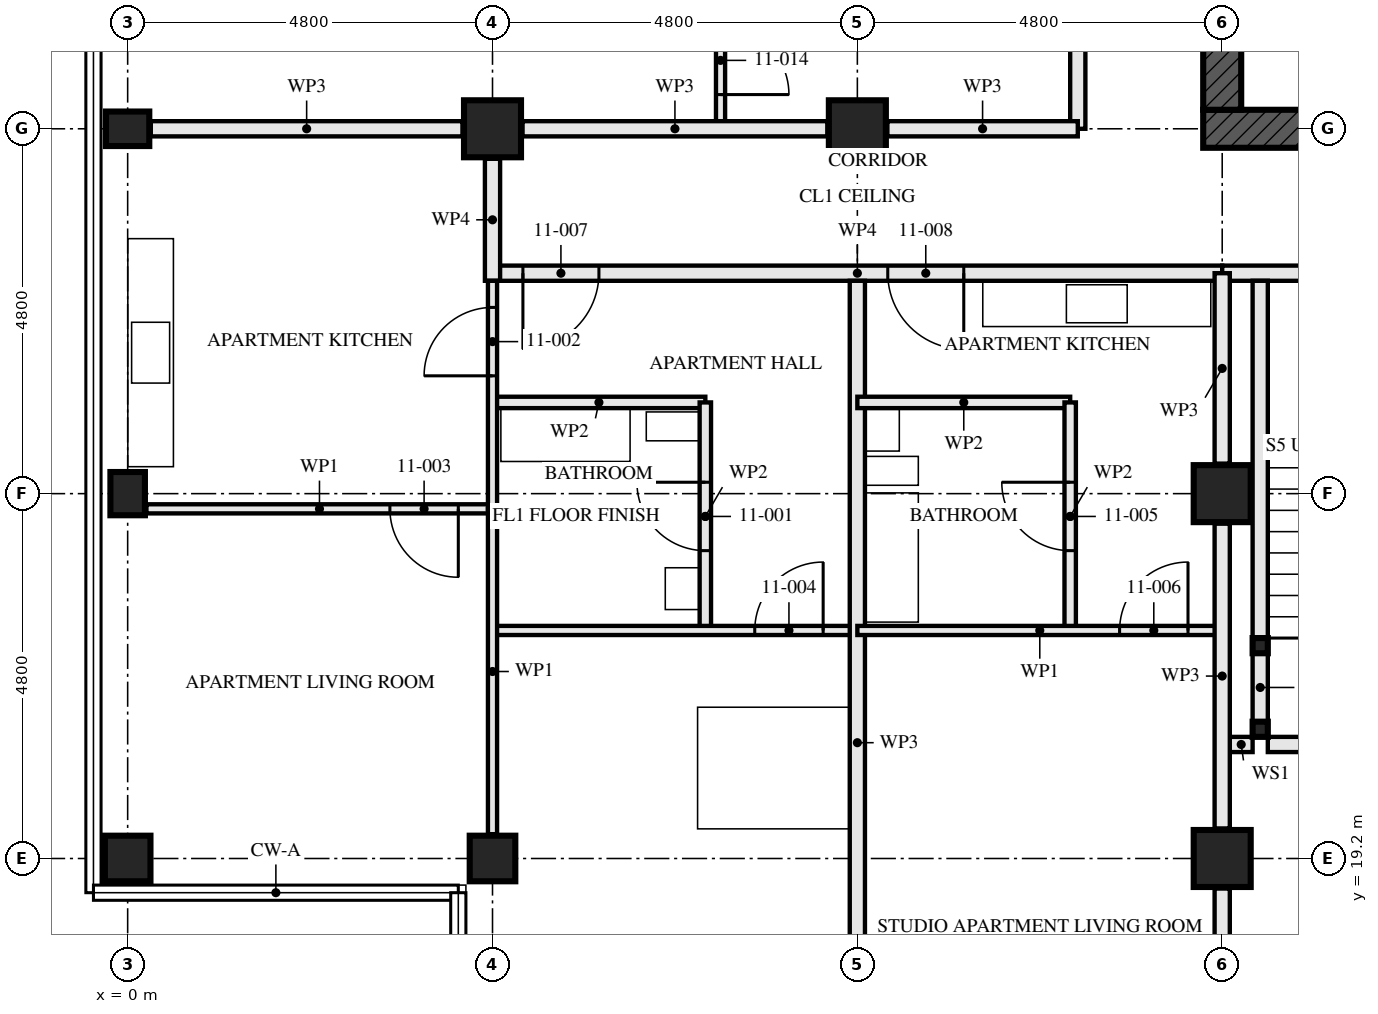
"""IFC4 building model, lengths in metres.
Left out: names, types, materials, properties, quantities, classifications, styles, units other than length and angle.
Written with IfcOpenShell. Run it as: python <this file> out.ifc"""

import sys

from ifc_helpers import new_model, si_unit, direction, frame, frame_2d, origin, origin_2d, place, context, subcontext, project, spatial, rectangle, hollow_rectangle, i_section, extrude, element, fill, save


model = new_model("IFC4")
c1 = context("Model", 3, precision=1e-05, world=origin(), true_north=direction((0.0, 1.0)))
c2 = subcontext(c1, "Body", "Model", "MODEL_VIEW")
j1 = project(units=[si_unit("LENGTHUNIT", "METRE"), si_unit("PLANEANGLEUNIT", "RADIAN")], contexts=[c1])
p1 = place(None, origin())
s1 = spatial("IfcSite", under=j1, at=p1, CompositionType="ELEMENT")
p2 = place(p1, origin())
s2 = spatial("IfcBuilding", under=s1, at=p2, CompositionType="ELEMENT")
p3 = place(p2, frame((0.0, 0.0, 44.5)))
s3 = spatial("IfcBuildingStorey", under=s2, at=p3, CompositionType="ELEMENT", Elevation=44.5)
p4 = place(p3, frame((0.0, 19.2, 0.0), z_axis=(0.0, 0.0, 1.0), x_axis=(0.0, 1.0, 0.0)))
e1 = element("IfcColumn", 1, at=p4, inside=s3, PredefinedType="COLUMN", context=c2, shape_type="SweptSolid", body=[
    extrude(hollow_rectangle(XDim=0.6, YDim=0.6, WallThickness=0.05, at=origin_2d()), origin(), (0.0, 0.0, 1.0), 3.5),
])
for number, where, z_axis, x_axis in (
    (2, (0.0, 24.0, 0.0), (0.0, 0.0, 1.0), (1.0, 0.0, 0.0)),
    (3, (0.0, 28.8, 0.0), (0.0, 0.0, 1.0), (0.0, 1.0, 0.0)),
):
    element("IfcColumn", number, at=place(p3, frame(where, z_axis=z_axis, x_axis=x_axis)), inside=s3, PredefinedType="COLUMN", context=c2, shape_type="SweptSolid", body=[
        extrude(i_section(OverallWidth=0.454, OverallDepth=0.569, WebThickness=0.078, FlangeThickness=0.125, FilletRadius=0.015, at=origin_2d()), origin(), (0.0, 0.0, 1.0), 3.5),
    ])
p5 = place(p3, frame((4.8, 19.2, 0.0), z_axis=(0.0, 0.0, 1.0), x_axis=(0.0, 1.0, 0.0)))
e4 = element("IfcColumn", 4, at=p5, inside=s3, PredefinedType="COLUMN", context=c2, shape_type="SweptSolid", body=[
    extrude(hollow_rectangle(XDim=0.6, YDim=0.6, WallThickness=0.05, at=origin_2d()), origin(), (0.0, 0.0, 1.0), 3.5),
])
for number, where, z_axis, x_axis in (
    (5, (4.8, 28.8, 0.0), (0.0, 0.0, 1.0), (0.0, 1.0, 0.0)),
    (6, (9.6, 28.8, 0.0), (0.0, 0.0, 1.0), (0.0, 1.0, 0.0)),
    (7, (14.4, 19.2, 0.0), (0.0, 0.0, 1.0), (1.0, 0.0, 0.0)),
    (8, (14.4, 24.0, 0.0), (0.0, 0.0, 1.0), (1.0, 0.0, 0.0)),
):
    element("IfcColumn", number, at=place(p3, frame(where, z_axis=z_axis, x_axis=x_axis)), inside=s3, PredefinedType="COLUMN", context=c2, shape_type="SweptSolid", body=[
        extrude(hollow_rectangle(XDim=0.75, YDim=0.75, WallThickness=0.08, at=origin_2d()), origin(), (0.0, 0.0, 1.0), 3.5),
    ])
p6 = place(p3, frame((14.15, 28.8, -0.17), z_axis=(0.0, 0.0, 1.0), x_axis=(1.0, 0.0, 0.0)))
e9 = element("IfcWall", 9, at=p6, inside=s3, PredefinedType="SHEAR", context=c2, shape_type="SweptSolid", body=[
    extrude(rectangle(XDim=14.9, YDim=0.5, at=frame_2d((7.45, 0.0))), origin(), (0.0, 0.0, 1.0), 3.5),
])
p7 = place(p6, frame((6.85, 0.0, 0.17)))
e10 = element("IfcOpeningElement", 10, at=p7, cuts=e9, PredefinedType="OPENING", context=c2, shape_type="SweptSolid", body=[
    extrude(rectangle(XDim=1.2, YDim=2.1, at=frame_2d((0.6, 1.05))), frame((0.0, 0.26, 0.0), z_axis=(0.0, -1.0, 0.0), x_axis=(1.0, 0.0, 0.0)), (0.0, 0.0, 1.0), 0.521),
])
p8 = place(p3, frame((14.4, 42.95, -0.17), z_axis=(0.0, 0.0, 1.0), x_axis=(0.0, -1.0, 0.0)))
e11 = element("IfcWall", 11, at=p8, inside=s3, PredefinedType="SHEAR", context=c2, shape_type="SweptSolid", body=[
    extrude(rectangle(XDim=13.9, YDim=0.5, at=frame_2d((6.95, 0.0))), origin(), (0.0, 0.0, 1.0), 3.5),
])
p9 = place(p8, frame((6.35, 0.0, 0.17)))
e12 = element("IfcOpeningElement", 12, at=p9, cuts=e11, PredefinedType="OPENING", context=c2, shape_type="SweptSolid", body=[
    extrude(rectangle(XDim=1.2, YDim=2.1, at=frame_2d((0.6, 1.05))), frame((0.0, 0.26, 0.0), z_axis=(0.0, -1.0, 0.0), x_axis=(1.0, 0.0, 0.0)), (0.0, 0.0, 1.0), 0.521),
])
for number, where, z_axis, x_axis in (
    (13, (14.9, 20.9, 0.0), (0.0, 0.0, 1.0), (1.0, 0.0, 0.0)),
    (14, (14.9, 22.0, 0.0), (0.0, 0.0, 1.0), (1.0, 0.0, 0.0)),
):
    element("IfcColumn", number, at=place(p3, frame(where, z_axis=z_axis, x_axis=x_axis)), inside=s3, PredefinedType="COLUMN", context=c2, shape_type="SweptSolid", body=[
        extrude(hollow_rectangle(XDim=0.2, YDim=0.2, WallThickness=0.008, at=origin_2d()), origin(), (0.0, 0.0, 1.0), 3.33),
    ])
p10 = place(p3, frame((7.6, 22.2, 0.0), z_axis=(0.0, 0.0, 1.0), x_axis=(0.0, 1.0, 0.0)))
e15 = element("IfcWall", 15, at=p10, inside=s3, PredefinedType="PARTITIONING", context=c2, shape_type="SweptSolid", body=[
    extrude(rectangle(XDim=3.0, YDim=0.15, at=frame_2d((1.5, 0.0))), origin(), (0.0, 0.0, 1.0), 2.55),
])
p11 = place(p10, frame((1.05, 0.0, 0.0)))
e16 = element("IfcOpeningElement", 16, at=p11, cuts=e15, PredefinedType="OPENING", context=c2, shape_type="SweptSolid", body=[
    extrude(rectangle(XDim=0.9, YDim=2.1, at=frame_2d((0.45, 1.05))), frame((0.0, 0.085, 0.0), z_axis=(0.0, -1.0, 0.0), x_axis=(1.0, 0.0, 0.0)), (0.0, 0.0, 1.0), 0.171),
])
p12 = place(p3, frame((4.8, 25.2, 0.0), z_axis=(0.0, 0.0, 1.0), x_axis=(1.0, 0.0, 0.0)))
e17 = element("IfcWall", 17, at=p12, inside=s3, PredefinedType="PARTITIONING", context=c2, shape_type="SweptSolid", body=[
    extrude(rectangle(XDim=2.8, YDim=0.15, at=frame_2d((1.4, 0.0))), origin(), (0.0, 0.0, 1.0), 3.33),
])
p13 = place(p3, frame((4.8, 23.8, 0.0), z_axis=(0.0, 0.0, 1.0), x_axis=(0.0, 1.0, 0.0)))
e18 = element("IfcWall", 18, at=p13, inside=s3, PredefinedType="PARTITIONING", context=c2, shape_type="SweptSolid", body=[
    extrude(rectangle(XDim=3.0, YDim=0.12, at=frame_2d((1.5, 0.0))), origin(), (0.0, 0.0, 1.0), 2.55),
])
p14 = place(p13, frame((1.75, 0.0, 0.0)))
e19 = element("IfcOpeningElement", 19, at=p14, cuts=e18, PredefinedType="OPENING", context=c2, shape_type="SweptSolid", body=[
    extrude(rectangle(XDim=0.9, YDim=2.1, at=frame_2d((0.45, 1.05))), frame((0.0, 0.071, 0.0), z_axis=(0.0, -1.0, 0.0), x_axis=(1.0, 0.0, 0.0)), (0.0, 0.0, 1.0), 0.141),
])
p15 = place(p3, frame((0.247, 23.8, 0.0), z_axis=(0.0, 0.0, 1.0), x_axis=(1.0, 0.0, 0.0)))
e20 = element("IfcWall", 20, at=p15, inside=s3, PredefinedType="PARTITIONING", context=c2, shape_type="SweptSolid", body=[
    extrude(rectangle(XDim=4.553, YDim=0.12, at=frame_2d((2.276, 0.0))), origin(), (0.0, 0.0, 1.0), 3.33),
])
p16 = place(p15, frame((3.203, 0.0, 0.0)))
e21 = element("IfcOpeningElement", 21, at=p16, cuts=e20, PredefinedType="OPENING", context=c2, shape_type="SweptSolid", body=[
    extrude(rectangle(XDim=0.9, YDim=2.1, at=frame_2d((0.45, 1.05))), frame((0.0, 0.071, 0.0), z_axis=(0.0, -1.0, 0.0), x_axis=(1.0, 0.0, 0.0)), (0.0, 0.0, 1.0), 0.141),
])
p17 = place(p3, frame((4.8, 22.2, 0.0), z_axis=(0.0, 0.0, 1.0), x_axis=(1.0, 0.0, 0.0)))
e22 = element("IfcWall", 22, at=p17, inside=s3, PredefinedType="PARTITIONING", context=c2, shape_type="SweptSolid", body=[
    extrude(rectangle(XDim=4.8, YDim=0.12, at=frame_2d((2.4, 0.0))), origin(), (0.0, 0.0, 1.0), 3.33),
])
p18 = place(p17, frame((3.45, 0.0, 0.0)))
e23 = element("IfcOpeningElement", 23, at=p18, cuts=e22, PredefinedType="OPENING", context=c2, shape_type="SweptSolid", body=[
    extrude(rectangle(XDim=0.9, YDim=2.1, at=frame_2d((0.45, 1.05))), frame((0.0, 0.071, 0.0), z_axis=(0.0, -1.0, 0.0), x_axis=(1.0, 0.0, 0.0)), (0.0, 0.0, 1.0), 0.141),
])
p19 = place(p3, frame((4.8, 19.52, 0.0), z_axis=(0.0, 0.0, 1.0), x_axis=(0.0, 1.0, 0.0)))
e24 = element("IfcWall", 24, at=p19, inside=s3, PredefinedType="PARTITIONING", context=c2, shape_type="SweptSolid", body=[
    extrude(rectangle(XDim=4.28, YDim=0.12, at=frame_2d((2.14, 0.0))), origin(), (0.0, 0.0, 1.0), 3.33),
])
p20 = place(p3, frame((9.6, 14.647, 0.0), z_axis=(0.0, 0.0, 1.0), x_axis=(0.0, 1.0, 0.0)))
e25 = element("IfcWall", 25, at=p20, inside=s3, PredefinedType="PARTITIONING", context=c2, shape_type="SweptSolid", body=[
    extrude(rectangle(XDim=12.153, YDim=0.2, at=frame_2d((6.077, 0.0))), origin(), (0.0, 0.0, 1.0), 2.55),
])
p21 = place(p3, frame((12.4, 22.2, 0.0), z_axis=(0.0, 0.0, 1.0), x_axis=(0.0, 1.0, 0.0)))
e26 = element("IfcWall", 26, at=p21, inside=s3, PredefinedType="PARTITIONING", context=c2, shape_type="SweptSolid", body=[
    extrude(rectangle(XDim=3.0, YDim=0.15, at=frame_2d((1.5, 0.0))), origin(), (0.0, 0.0, 1.0), 2.55),
])
p22 = place(p21, frame((1.05, 0.0, 0.0)))
e27 = element("IfcOpeningElement", 27, at=p22, cuts=e26, PredefinedType="OPENING", context=c2, shape_type="SweptSolid", body=[
    extrude(rectangle(XDim=0.9, YDim=2.1, at=frame_2d((0.45, 1.05))), frame((0.0, 0.085, 0.0), z_axis=(0.0, -1.0, 0.0), x_axis=(1.0, 0.0, 0.0)), (0.0, 0.0, 1.0), 0.171),
])
p23 = place(p3, frame((9.6, 25.2, 0.0), z_axis=(0.0, 0.0, 1.0), x_axis=(1.0, 0.0, 0.0)))
e28 = element("IfcWall", 28, at=p23, inside=s3, PredefinedType="PARTITIONING", context=c2, shape_type="SweptSolid", body=[
    extrude(rectangle(XDim=2.8, YDim=0.15, at=frame_2d((1.4, 0.0))), origin(), (0.0, 0.0, 1.0), 3.33),
])
p24 = place(p3, frame((9.6, 22.2, 0.0), z_axis=(0.0, 0.0, 1.0), x_axis=(1.0, 0.0, 0.0)))
e29 = element("IfcWall", 29, at=p24, inside=s3, PredefinedType="PARTITIONING", context=c2, shape_type="SweptSolid", body=[
    extrude(rectangle(XDim=4.8, YDim=0.12, at=frame_2d((2.4, 0.0))), origin(), (0.0, 0.0, 1.0), 3.33),
])
p25 = place(p24, frame((3.45, 0.0, 0.0)))
e30 = element("IfcOpeningElement", 30, at=p25, cuts=e29, PredefinedType="OPENING", context=c2, shape_type="SweptSolid", body=[
    extrude(rectangle(XDim=0.9, YDim=2.1, at=frame_2d((0.45, 1.05))), frame((0.0, 0.071, 0.0), z_axis=(0.0, -1.0, 0.0), x_axis=(1.0, 0.0, 0.0)), (0.0, 0.0, 1.0), 0.141),
])
p26 = place(p3, frame((4.8, 26.9, 0.0), z_axis=(0.0, 0.0, 1.0), x_axis=(1.0, 0.0, 0.0)))
e31 = element("IfcWall", 31, at=p26, inside=s3, PredefinedType="PARTITIONING", context=c2, shape_type="SweptSolid", body=[
    extrude(rectangle(XDim=9.6, YDim=0.2, at=frame_2d((4.8, 0.0))), origin(), (0.0, 0.0, 1.0), 3.33),
])
p27 = place(p26, frame((0.4, 0.0, 0.0)))
e32 = element("IfcOpeningElement", 32, at=p27, cuts=e31, PredefinedType="OPENING", context=c2, shape_type="SweptSolid", body=[
    extrude(rectangle(XDim=1.0, YDim=2.1, at=frame_2d((0.5, 1.05))), frame((0.0, 0.111, 0.0), z_axis=(0.0, -1.0, 0.0), x_axis=(1.0, 0.0, 0.0)), (0.0, 0.0, 1.0), 0.221),
])
p28 = place(p26, frame((5.2, 0.0, 0.0)))
e33 = element("IfcOpeningElement", 33, at=p28, cuts=e31, PredefinedType="OPENING", context=c2, shape_type="SweptSolid", body=[
    extrude(rectangle(XDim=1.0, YDim=2.1, at=frame_2d((0.5, 1.05))), frame((0.0, 0.111, 0.0), z_axis=(0.0, -1.0, 0.0), x_axis=(1.0, 0.0, 0.0)), (0.0, 0.0, 1.0), 0.221),
])
p29 = place(p3, frame((4.8, 26.8, 0.0), z_axis=(0.0, 0.0, 1.0), x_axis=(0.0, 1.0, 0.0)))
e34 = element("IfcWall", 34, at=p29, inside=s3, PredefinedType="PARTITIONING", context=c2, shape_type="SweptSolid", body=[
    extrude(rectangle(XDim=1.605, YDim=0.2, at=frame_2d((0.802, 0.0))), origin(), (0.0, 0.0, 1.0), 3.33),
])
p30 = place(p3, frame((7.8, 33.6, 0.0), z_axis=(0.0, 0.0, 1.0), x_axis=(0.0, -1.0, 0.0)))
e35 = element("IfcWall", 35, at=p30, inside=s3, PredefinedType="PARTITIONING", context=c2, shape_type="SweptSolid", body=[
    extrude(rectangle(XDim=4.8, YDim=0.12, at=frame_2d((2.4, 0.0))), origin(), (0.0, 0.0, 1.0), 3.33),
])
p31 = place(p30, frame((3.45, 0.0, 0.0)))
e36 = element("IfcOpeningElement", 36, at=p31, cuts=e35, PredefinedType="OPENING", context=c2, shape_type="SweptSolid", body=[
    extrude(rectangle(XDim=0.9, YDim=2.1, at=frame_2d((0.45, 1.05))), frame((0.0, 0.071, 0.0), z_axis=(0.0, -1.0, 0.0), x_axis=(1.0, 0.0, 0.0)), (0.0, 0.0, 1.0), 0.141),
])
p32 = place(p3, frame((12.5, 43.2, 0.0), z_axis=(0.0, 0.0, 1.0), x_axis=(0.0, -1.0, 0.0)))
e37 = element("IfcWall", 37, at=p32, inside=s3, PredefinedType="PARTITIONING", context=c2, shape_type="SweptSolid", body=[
    extrude(rectangle(XDim=14.4, YDim=0.2, at=frame_2d((7.2, 0.0))), origin(), (0.0, 0.0, 1.0), 2.55),
])
p33 = place(p32, frame((1.4, 0.0, 0.0)))
e38 = element("IfcOpeningElement", 38, at=p33, cuts=e37, PredefinedType="OPENING", context=c2, shape_type="SweptSolid", body=[
    extrude(rectangle(XDim=1.0, YDim=2.1, at=frame_2d((0.5, 1.05))), frame((0.0, 0.111, 0.0), z_axis=(0.0, -1.0, 0.0), x_axis=(1.0, 0.0, 0.0)), (0.0, 0.0, 1.0), 0.221),
])
p34 = place(p32, frame((10.0, 0.0, 0.0)))
e39 = element("IfcOpeningElement", 39, at=p34, cuts=e37, PredefinedType="OPENING", context=c2, shape_type="SweptSolid", body=[
    extrude(rectangle(XDim=1.0, YDim=2.1, at=frame_2d((0.5, 1.05))), frame((0.0, 0.111, 0.0), z_axis=(0.0, -1.0, 0.0), x_axis=(1.0, 0.0, 0.0)), (0.0, 0.0, 1.0), 0.221),
])
p35 = place(p3, frame((14.9, 21.0, 0.0), z_axis=(0.0, 0.0, 1.0), x_axis=(0.0, 1.0, 0.0)))
e40 = element("IfcWall", 40, at=p35, inside=s3, PredefinedType="SOLIDWALL", context=c2, shape_type="SweptSolid", body=[
    extrude(rectangle(XDim=0.9, YDim=0.2, at=frame_2d((0.45, 0.0))), origin(), (0.0, 0.0, 1.0), 2.99),
])
p36 = place(p3, frame((14.9, 22.1, 0.0), z_axis=(0.0, 0.0, 1.0), x_axis=(0.0, 1.0, 0.0)))
e41 = element("IfcWall", 41, at=p36, inside=s3, PredefinedType="SOLIDWALL", context=c2, shape_type="SweptSolid", body=[
    extrude(rectangle(XDim=4.7, YDim=0.2, at=frame_2d((2.35, 0.0))), origin(), (0.0, 0.0, 1.0), 2.99),
])
p37 = place(p3, frame((14.5, 20.7, 0.0), z_axis=(0.0, 0.0, 1.0), x_axis=(1.0, 0.0, 0.0)))
e42 = element("IfcWall", 42, at=p37, inside=s3, PredefinedType="SOLIDWALL", context=c2, shape_type="SweptSolid", body=[
    extrude(rectangle(XDim=0.3, YDim=0.2, at=frame_2d((0.15, 0.0))), origin(), (0.0, 0.0, 1.0), 3.33),
])
p38 = place(p3, frame((15.0, 20.7, 0.0), z_axis=(0.0, 0.0, 1.0), x_axis=(1.0, 0.0, 0.0)))
e43 = element("IfcWall", 43, at=p38, inside=s3, PredefinedType="SOLIDWALL", context=c2, shape_type="SweptSolid", body=[
    extrude(rectangle(XDim=2.6, YDim=0.2, at=frame_2d((1.3, 0.0))), origin(), (0.0, 0.0, 1.0), 3.33),
])
p39 = place(p3, frame((14.4, 26.9, 0.0), z_axis=(0.0, 0.0, 1.0), x_axis=(1.0, 0.0, 0.0)))
e44 = element("IfcWall", 44, at=p39, inside=s3, PredefinedType="SOLIDWALL", context=c2, shape_type="SweptSolid", body=[
    extrude(rectangle(XDim=3.4, YDim=0.2, at=frame_2d((1.7, 0.0))), origin(), (0.0, 0.0, 1.0), 3.33),
])
p40 = place(p39, frame((1.4, 0.0, 0.0)))
e45 = element("IfcOpeningElement", 45, at=p40, cuts=e44, PredefinedType="OPENING", context=c2, shape_type="SweptSolid", body=[
    extrude(rectangle(XDim=1.0, YDim=2.1, at=frame_2d((0.5, 1.05))), frame((0.0, 0.111, 0.0), z_axis=(0.0, -1.0, 0.0), x_axis=(1.0, 0.0, 0.0)), (0.0, 0.0, 1.0), 0.221),
])
p41 = place(p3, frame((12.5, 28.8, 0.0), z_axis=(0.0, 0.0, 1.0), x_axis=(-1.0, 0.0, 0.0)))
e46 = element("IfcWall", 46, at=p41, inside=s3, PredefinedType="PARTITIONING", context=c2, shape_type="SweptSolid", body=[
    extrude(rectangle(XDim=2.505, YDim=0.2, at=frame_2d((1.252, 0.0))), origin(), (0.0, 0.0, 1.0), 2.32),
])
p42 = place(p3, frame((9.205, 28.8, 0.0), z_axis=(0.0, 0.0, 1.0), x_axis=(-1.0, 0.0, 0.0)))
e47 = element("IfcWall", 47, at=p42, inside=s3, PredefinedType="PARTITIONING", context=c2, shape_type="SweptSolid", body=[
    extrude(rectangle(XDim=4.01, YDim=0.2, at=frame_2d((2.005, 0.0))), origin(), (0.0, 0.0, 1.0), 2.32),
])
p43 = place(p3, frame((4.405, 28.8, 0.0), z_axis=(0.0, 0.0, 1.0), x_axis=(-1.0, 0.0, 0.0)))
e48 = element("IfcWall", 48, at=p43, inside=s3, PredefinedType="PARTITIONING", context=c2, shape_type="SweptSolid", body=[
    extrude(rectangle(XDim=4.101, YDim=0.2, at=frame_2d((2.05, 0.0))), origin(), (0.0, 0.0, 1.0), 2.32),
])
p44 = place(p3, frame((14.4, 14.647, 0.0), z_axis=(0.0, 0.0, 1.0), x_axis=(0.0, 1.0, 0.0)))
e49 = element("IfcWall", 49, at=p44, inside=s3, PredefinedType="PARTITIONING", context=c2, shape_type="SweptSolid", body=[
    extrude(rectangle(XDim=4.158, YDim=0.2, at=frame_2d((2.079, 0.0))), origin(), (0.0, 0.0, 1.0), 2.32),
])
p45 = place(p3, frame((14.4, 19.595, 0.0), z_axis=(0.0, 0.0, 1.0), x_axis=(0.0, 1.0, 0.0)))
e50 = element("IfcWall", 50, at=p45, inside=s3, PredefinedType="PARTITIONING", context=c2, shape_type="SweptSolid", body=[
    extrude(rectangle(XDim=4.01, YDim=0.2, at=frame_2d((2.005, 0.0))), origin(), (0.0, 0.0, 1.0), 2.32),
])
p46 = place(p3, frame((14.4, 24.395, 0.0), z_axis=(0.0, 0.0, 1.0), x_axis=(0.0, 1.0, 0.0)))
e51 = element("IfcWall", 51, at=p46, inside=s3, PredefinedType="PARTITIONING", context=c2, shape_type="SweptSolid", body=[
    extrude(rectangle(XDim=2.505, YDim=0.2, at=frame_2d((1.252, 0.0))), origin(), (0.0, 0.0, 1.0), 2.32),
])
p47 = place(p11, origin())
e52 = element("IfcDoor", 52, at=p47, inside=s3, OperationType="SINGLE_SWING_LEFT", PredefinedType="DOOR", context=c2, shape_type="SweptSolid", body=[
    extrude(rectangle(XDim=0.9, YDim=2.1, at=frame_2d((0.45, 1.05))), frame((0.0, 0.022, 0.0), z_axis=(0.0, -1.0, 0.0), x_axis=(1.0, 0.0, 0.0)), (0.0, 0.0, 1.0), 0.044),
])
fill(e16, e52)
p48 = place(p14, origin())
e53 = element("IfcDoor", 53, at=p48, inside=s3, OperationType="SINGLE_SWING_RIGHT", PredefinedType="DOOR", context=c2, shape_type="SweptSolid", body=[
    extrude(rectangle(XDim=0.9, YDim=2.1, at=frame_2d((0.45, 1.05))), frame((0.0, 0.022, 0.0), z_axis=(0.0, -1.0, 0.0), x_axis=(1.0, 0.0, 0.0)), (0.0, 0.0, 1.0), 0.044),
])
fill(e19, e53)
p49 = place(p16, frame((0.9, 0.0, 0.0), z_axis=(0.0, 0.0, 1.0), x_axis=(-1.0, 0.0, 0.0)))
e54 = element("IfcDoor", 54, at=p49, inside=s3, OperationType="SINGLE_SWING_RIGHT", PredefinedType="DOOR", context=c2, shape_type="SweptSolid", body=[
    extrude(rectangle(XDim=0.9, YDim=2.1, at=frame_2d((0.45, 1.05))), frame((0.0, 0.022, 0.0), z_axis=(0.0, -1.0, 0.0), x_axis=(1.0, 0.0, 0.0)), (0.0, 0.0, 1.0), 0.044),
])
fill(e21, e54)
p50 = place(p18, origin())
e55 = element("IfcDoor", 55, at=p50, inside=s3, OperationType="SINGLE_SWING_LEFT", PredefinedType="DOOR", context=c2, shape_type="SweptSolid", body=[
    extrude(rectangle(XDim=0.9, YDim=2.1, at=frame_2d((0.45, 1.05))), frame((0.0, 0.022, 0.0), z_axis=(0.0, -1.0, 0.0), x_axis=(1.0, 0.0, 0.0)), (0.0, 0.0, 1.0), 0.044),
])
fill(e23, e55)
p51 = place(p22, origin())
e56 = element("IfcDoor", 56, at=p51, inside=s3, OperationType="SINGLE_SWING_LEFT", PredefinedType="DOOR", context=c2, shape_type="SweptSolid", body=[
    extrude(rectangle(XDim=0.9, YDim=2.1, at=frame_2d((0.45, 1.05))), frame((0.0, 0.022, 0.0), z_axis=(0.0, -1.0, 0.0), x_axis=(1.0, 0.0, 0.0)), (0.0, 0.0, 1.0), 0.044),
])
fill(e27, e56)
p52 = place(p25, origin())
e57 = element("IfcDoor", 57, at=p52, inside=s3, OperationType="SINGLE_SWING_LEFT", PredefinedType="DOOR", context=c2, shape_type="SweptSolid", body=[
    extrude(rectangle(XDim=0.9, YDim=2.1, at=frame_2d((0.45, 1.05))), frame((0.0, 0.022, 0.0), z_axis=(0.0, -1.0, 0.0), x_axis=(1.0, 0.0, 0.0)), (0.0, 0.0, 1.0), 0.044),
])
fill(e30, e57)
p53 = place(p27, frame((1.0, 0.0, 0.0), z_axis=(0.0, 0.0, 1.0), x_axis=(-1.0, 0.0, 0.0)))
e58 = element("IfcDoor", 58, at=p53, inside=s3, OperationType="SINGLE_SWING_LEFT", PredefinedType="DOOR", context=c2, shape_type="SweptSolid", body=[
    extrude(rectangle(XDim=1.0, YDim=2.1, at=frame_2d((0.5, 1.05))), frame((0.0, 0.027, 0.0), z_axis=(0.0, -1.0, 0.0), x_axis=(1.0, 0.0, 0.0)), (0.0, 0.0, 1.0), 0.054),
])
fill(e32, e58)
p54 = place(p28, frame((1.0, 0.0, 0.0), z_axis=(0.0, 0.0, 1.0), x_axis=(-1.0, 0.0, 0.0)))
e59 = element("IfcDoor", 59, at=p54, inside=s3, OperationType="SINGLE_SWING_RIGHT", PredefinedType="DOOR", context=c2, shape_type="SweptSolid", body=[
    extrude(rectangle(XDim=1.0, YDim=2.1, at=frame_2d((0.5, 1.05))), frame((0.0, 0.027, 0.0), z_axis=(0.0, -1.0, 0.0), x_axis=(1.0, 0.0, 0.0)), (0.0, 0.0, 1.0), 0.054),
])
fill(e33, e59)
p55 = place(p31, origin())
e60 = element("IfcDoor", 60, at=p55, inside=s3, OperationType="SINGLE_SWING_LEFT", PredefinedType="DOOR", context=c2, shape_type="SweptSolid", body=[
    extrude(rectangle(XDim=0.9, YDim=2.1, at=frame_2d((0.45, 1.05))), frame((0.0, 0.022, 0.0), z_axis=(0.0, -1.0, 0.0), x_axis=(1.0, 0.0, 0.0)), (0.0, 0.0, 1.0), 0.044),
])
fill(e36, e60)
save(model, sys.argv[1])
